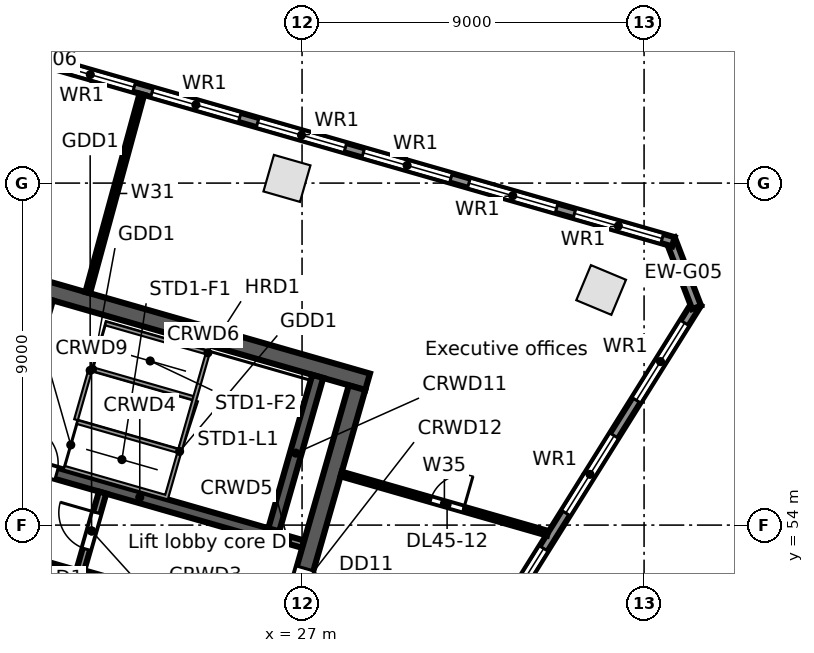
"""IFC4 building model, lengths in metres.
Left out: names, types, materials, properties, quantities, classifications, styles, units other than length and angle.
Written with IfcOpenShell. Run it as: python <this file> out.ifc"""

import sys

from ifc_helpers import new_model, si_unit, direction, frame, frame_2d, origin, origin_2d, place, context, subcontext, project, spatial, rectangle, extrude, element, fill, save


model = new_model("IFC4")
c1 = context("Model", 3, precision=1e-05, world=origin(), true_north=direction((0.0, 1.0)))
c2 = subcontext(c1, "Body", "Model", "MODEL_VIEW")
j1 = project(units=[si_unit("LENGTHUNIT", "METRE"), si_unit("PLANEANGLEUNIT", "RADIAN")], contexts=[c1])
p1 = place(None, origin())
s1 = spatial("IfcSite", under=j1, at=p1, CompositionType="ELEMENT")
p2 = place(p1, origin())
s2 = spatial("IfcBuilding", under=s1, at=p2, CompositionType="ELEMENT")
p3 = place(p2, frame((0.0, 0.0, 207.5)))
s3 = spatial("IfcBuildingStorey", under=s2, at=p3, CompositionType="ELEMENT", Elevation=207.5)
for number, where, z_axis, x_axis in (
    (1, (26.603, 63.124, 0.0), (0.0, 0.0, 1.0), (-0.961, 0.276, 0.0)),
    (2, (34.87, 60.187, 0.0), (0.0, 0.0, 1.0), (-0.923, 0.385, 0.0)),
):
    element("IfcColumn", number, at=place(p3, frame(where, z_axis=z_axis, x_axis=x_axis)), inside=s3, PredefinedType="COLUMN", context=c2, shape_type="SweptSolid", body=[
        extrude(rectangle(XDim=1.0, YDim=1.0, at=origin_2d()), origin(), (0.0, 0.0, 1.0), 3.9),
    ])
p4 = place(p3, frame((37.392, 59.84, 0.0), z_axis=(0.0, 0.0, 1.0), x_axis=(-0.529919909431, -0.848047692992, 0.0)))
e3 = element("IfcWall", 3, at=p4, inside=s3, PredefinedType="STANDARD", context=c2, shape_type="SweptSolid", body=[
    extrude(rectangle(XDim=21.104, YDim=0.25, at=frame_2d((10.552, 0.0))), origin(), (0.0, 0.0, 1.0), 3.62),
])
p5 = place(p4, frame((18.112, 0.0, 0.8)))
e4 = element("IfcOpeningElement", 4, at=p5, cuts=e3, PredefinedType="OPENING", context=c2, shape_type="SweptSolid", body=[
    extrude(rectangle(XDim=2.4, YDim=2.2, at=frame_2d((1.2, 1.1))), frame((0.0, 0.135, 0.0), z_axis=(0.0, -1.0, 0.0), x_axis=(1.0, 0.0, 0.0)), (0.0, 0.0, 1.0), 0.27),
])
p6 = place(p4, frame((14.612, 0.0, 0.8)))
e5 = element("IfcOpeningElement", 5, at=p6, cuts=e3, PredefinedType="OPENING", context=c2, shape_type="SweptSolid", body=[
    extrude(rectangle(XDim=2.4, YDim=2.2, at=frame_2d((1.2, 1.1))), frame((0.0, 0.135, 0.0), z_axis=(0.0, -1.0, 0.0), x_axis=(1.0, 0.0, 0.0)), (0.0, 0.0, 1.0), 0.27),
])
p7 = place(p4, frame((11.112, 0.0, 0.8)))
e6 = element("IfcOpeningElement", 6, at=p7, cuts=e3, PredefinedType="OPENING", context=c2, shape_type="SweptSolid", body=[
    extrude(rectangle(XDim=2.4, YDim=2.2, at=frame_2d((1.2, 1.1))), frame((0.0, 0.135, 0.0), z_axis=(0.0, -1.0, 0.0), x_axis=(1.0, 0.0, 0.0)), (0.0, 0.0, 1.0), 0.27),
])
p8 = place(p4, frame((7.612, 0.0, 0.8)))
e7 = element("IfcOpeningElement", 7, at=p8, cuts=e3, PredefinedType="OPENING", context=c2, shape_type="SweptSolid", body=[
    extrude(rectangle(XDim=2.4, YDim=2.2, at=frame_2d((1.2, 1.1))), frame((0.0, 0.135, 0.0), z_axis=(0.0, -1.0, 0.0), x_axis=(1.0, 0.0, 0.0)), (0.0, 0.0, 1.0), 0.27),
])
p9 = place(p4, frame((4.112, 0.0, 0.8)))
e8 = element("IfcOpeningElement", 8, at=p9, cuts=e3, PredefinedType="OPENING", context=c2, shape_type="SweptSolid", body=[
    extrude(rectangle(XDim=2.4, YDim=2.2, at=frame_2d((1.2, 1.1))), frame((0.0, 0.135, 0.0), z_axis=(0.0, -1.0, 0.0), x_axis=(1.0, 0.0, 0.0)), (0.0, 0.0, 1.0), 0.27),
])
p10 = place(p4, frame((0.612, 0.0, 0.8)))
e9 = element("IfcOpeningElement", 9, at=p10, cuts=e3, PredefinedType="OPENING", context=c2, shape_type="SweptSolid", body=[
    extrude(rectangle(XDim=2.4, YDim=2.2, at=frame_2d((1.2, 1.1))), frame((0.0, 0.135, 0.0), z_axis=(0.0, -1.0, 0.0), x_axis=(1.0, 0.0, 0.0)), (0.0, 0.0, 1.0), 0.27),
])
p11 = place(p3, frame((36.69, 61.531, 0.0), z_axis=(0.0, 0.0, 1.0), x_axis=(0.358377147136, -0.933576895821, 0.0)))
e10 = element("IfcWall", 10, at=p11, inside=s3, PredefinedType="STANDARD", context=c2, shape_type="SweptSolid", body=[
    extrude(rectangle(XDim=1.93, YDim=0.25, at=frame_2d((0.965, 0.0))), origin(), (0.0, 0.0, 1.0), 3.62),
])
p12 = place(p3, frame((3.34, 71.042, 0.0), z_axis=(0.0, 0.0, 1.0), x_axis=(0.96126179431, -0.275637012753, 0.0)))
e11 = element("IfcWall", 11, at=p12, inside=s3, PredefinedType="STANDARD", context=c2, shape_type="SweptSolid", body=[
    extrude(rectangle(XDim=34.779, YDim=0.25, at=frame_2d((17.39, 0.0))), origin(), (0.0, 0.0, 1.0), 3.62),
])
p13 = place(p12, frame((32.071, 0.0, 0.8)))
e12 = element("IfcOpeningElement", 12, at=p13, cuts=e11, PredefinedType="OPENING", context=c2, shape_type="SweptSolid", body=[
    extrude(rectangle(XDim=2.4, YDim=2.2, at=frame_2d((1.2, 1.1))), frame((0.0, 0.135, 0.0), z_axis=(0.0, -1.0, 0.0), x_axis=(1.0, 0.0, 0.0)), (0.0, 0.0, 1.0), 0.27),
])
p14 = place(p12, frame((29.18, 0.0, 0.8)))
e13 = element("IfcOpeningElement", 13, at=p14, cuts=e11, PredefinedType="OPENING", context=c2, shape_type="SweptSolid", body=[
    extrude(rectangle(XDim=2.4, YDim=2.2, at=frame_2d((1.2, 1.1))), frame((0.0, 0.135, 0.0), z_axis=(0.0, -1.0, 0.0), x_axis=(1.0, 0.0, 0.0)), (0.0, 0.0, 1.0), 0.27),
])
p15 = place(p12, frame((26.289, 0.0, 0.8)))
e14 = element("IfcOpeningElement", 14, at=p15, cuts=e11, PredefinedType="OPENING", context=c2, shape_type="SweptSolid", body=[
    extrude(rectangle(XDim=2.4, YDim=2.2, at=frame_2d((1.2, 1.1))), frame((0.0, 0.135, 0.0), z_axis=(0.0, -1.0, 0.0), x_axis=(1.0, 0.0, 0.0)), (0.0, 0.0, 1.0), 0.27),
])
p16 = place(p12, frame((23.398, 0.0, 0.8)))
e15 = element("IfcOpeningElement", 15, at=p16, cuts=e11, PredefinedType="OPENING", context=c2, shape_type="SweptSolid", body=[
    extrude(rectangle(XDim=2.4, YDim=2.2, at=frame_2d((1.2, 1.1))), frame((0.0, 0.135, 0.0), z_axis=(0.0, -1.0, 0.0), x_axis=(1.0, 0.0, 0.0)), (0.0, 0.0, 1.0), 0.27),
])
p17 = place(p12, frame((20.508, 0.0, 0.8)))
e16 = element("IfcOpeningElement", 16, at=p17, cuts=e11, PredefinedType="OPENING", context=c2, shape_type="SweptSolid", body=[
    extrude(rectangle(XDim=2.4, YDim=2.2, at=frame_2d((1.2, 1.1))), frame((0.0, 0.135, 0.0), z_axis=(0.0, -1.0, 0.0), x_axis=(1.0, 0.0, 0.0)), (0.0, 0.0, 1.0), 0.27),
])
p18 = place(p12, frame((17.616, 0.0, 0.8)))
e17 = element("IfcOpeningElement", 17, at=p18, cuts=e11, PredefinedType="OPENING", context=c2, shape_type="SweptSolid", body=[
    extrude(rectangle(XDim=2.4, YDim=2.2, at=frame_2d((1.2, 1.1))), frame((0.0, 0.135, 0.0), z_axis=(0.0, -1.0, 0.0), x_axis=(1.0, 0.0, 0.0)), (0.0, 0.0, 1.0), 0.27),
])
p19 = place(p12, frame((14.726, 0.0, 0.8)))
e18 = element("IfcOpeningElement", 18, at=p19, cuts=e11, PredefinedType="OPENING", context=c2, shape_type="SweptSolid", body=[
    extrude(rectangle(XDim=2.4, YDim=2.2, at=frame_2d((1.2, 1.1))), frame((0.0, 0.135, 0.0), z_axis=(0.0, -1.0, 0.0), x_axis=(1.0, 0.0, 0.0)), (0.0, 0.0, 1.0), 0.27),
])
p20 = place(p12, frame((11.834, 0.0, 0.8)))
e19 = element("IfcOpeningElement", 19, at=p20, cuts=e11, PredefinedType="OPENING", context=c2, shape_type="SweptSolid", body=[
    extrude(rectangle(XDim=2.4, YDim=2.2, at=frame_2d((1.2, 1.1))), frame((0.0, 0.135, 0.0), z_axis=(0.0, -1.0, 0.0), x_axis=(1.0, 0.0, 0.0)), (0.0, 0.0, 1.0), 0.27),
])
p21 = place(p12, frame((8.944, 0.0, 0.8)))
e20 = element("IfcOpeningElement", 20, at=p21, cuts=e11, PredefinedType="OPENING", context=c2, shape_type="SweptSolid", body=[
    extrude(rectangle(XDim=2.4, YDim=2.2, at=frame_2d((1.2, 1.1))), frame((0.0, 0.135, 0.0), z_axis=(0.0, -1.0, 0.0), x_axis=(1.0, 0.0, 0.0)), (0.0, 0.0, 1.0), 0.27),
])
p22 = place(p12, frame((6.052, 0.0, 0.8)))
e21 = element("IfcOpeningElement", 21, at=p22, cuts=e11, PredefinedType="OPENING", context=c2, shape_type="SweptSolid", body=[
    extrude(rectangle(XDim=2.4, YDim=2.2, at=frame_2d((1.2, 1.1))), frame((0.0, 0.135, 0.0), z_axis=(0.0, -1.0, 0.0), x_axis=(1.0, 0.0, 0.0)), (0.0, 0.0, 1.0), 0.27),
])
p23 = place(p12, frame((3.162, 0.0, 0.8)))
e22 = element("IfcOpeningElement", 22, at=p23, cuts=e11, PredefinedType="OPENING", context=c2, shape_type="SweptSolid", body=[
    extrude(rectangle(XDim=2.4, YDim=2.2, at=frame_2d((1.2, 1.1))), frame((0.0, 0.135, 0.0), z_axis=(0.0, -1.0, 0.0), x_axis=(1.0, 0.0, 0.0)), (0.0, 0.0, 1.0), 0.27),
])
p24 = place(p12, frame((0.271, 0.0, 0.8)))
e23 = element("IfcOpeningElement", 23, at=p24, cuts=e11, PredefinedType="OPENING", context=c2, shape_type="SweptSolid", body=[
    extrude(rectangle(XDim=2.4, YDim=2.2, at=frame_2d((1.2, 1.1))), frame((0.0, 0.135, 0.0), z_axis=(0.0, -1.0, 0.0), x_axis=(1.0, 0.0, 0.0)), (0.0, 0.0, 1.0), 0.27),
])
p25 = place(p3, frame((18.583, 53.423, 0.0), z_axis=(0.0, 0.0, 1.0), x_axis=(0.961259287968, -0.275645753268, 0.0)))
e24 = element("IfcWall", 24, at=p25, inside=s3, PredefinedType="SOLIDWALL", context=c2, shape_type="SweptSolid", body=[
    extrude(rectangle(XDim=2.65, YDim=0.2, at=frame_2d((1.325, 0.0))), origin(), (0.0, 0.0, 1.0), 3.62),
])
p26 = place(p3, frame((21.131, 52.692, 0.0), z_axis=(0.0, 0.0, 1.0), x_axis=(0.961261488075, -0.275638080722, 0.0)))
e25 = element("IfcWall", 25, at=p26, inside=s3, PredefinedType="SOLIDWALL", context=c2, shape_type="SweptSolid", body=[
    extrude(rectangle(XDim=5.45, YDim=0.3, at=frame_2d((2.725, 0.0))), origin(), (0.0, 0.0, 1.0), 3.62),
])
p27 = place(p26, frame((0.95, 0.0, 0.0)))
e26 = element("IfcOpeningElement", 26, at=p27, cuts=e25, PredefinedType="OPENING", context=c2, shape_type="SweptSolid", body=[
    extrude(rectangle(XDim=0.9, YDim=2.1, at=frame_2d((0.45, 1.05))), frame((0.0, 0.16, 0.0), z_axis=(0.0, -1.0, 0.0), x_axis=(1.0, 0.0, 0.0)), (0.0, 0.0, 1.0), 0.32),
])
p28 = place(p26, frame((3.75, 0.0, 0.0)))
e27 = element("IfcOpeningElement", 27, at=p28, cuts=e25, PredefinedType="OPENING", context=c2, shape_type="SweptSolid", body=[
    extrude(rectangle(XDim=0.9, YDim=2.1, at=frame_2d((0.45, 1.05))), frame((0.0, 0.16, 0.0), z_axis=(0.0, -1.0, 0.0), x_axis=(1.0, 0.0, 0.0)), (0.0, 0.0, 1.0), 0.32),
])
p29 = place(p3, frame((19.245, 55.73, 0.0), z_axis=(0.0, 0.0, 1.0), x_axis=(0.961263007877, -0.275632780503, 0.0)))
e28 = element("IfcWall", 28, at=p29, inside=s3, PredefinedType="SOLIDWALL", context=c2, shape_type="SweptSolid", body=[
    extrude(rectangle(XDim=7.25, YDim=0.3, at=frame_2d((3.625, 0.0))), origin(), (0.0, 0.0, 1.0), 3.62),
])
p30 = place(p29, frame((0.35, 0.0, 0.0)))
e29 = element("IfcOpeningElement", 29, at=p30, cuts=e28, PredefinedType="OPENING", context=c2, shape_type="SweptSolid", body=[
    extrude(rectangle(XDim=1.0, YDim=2.1, at=frame_2d((0.5, 1.05))), frame((0.0, 0.16, 0.0), z_axis=(0.0, -1.0, 0.0), x_axis=(1.0, 0.0, 0.0)), (0.0, 0.0, 1.0), 0.32),
])
p31 = place(p3, frame((26.214, 53.732, 0.0), z_axis=(0.0, 0.0, 1.0), x_axis=(0.961241665642, -0.275707200184, 0.0)))
e30 = element("IfcWall", 30, at=p31, inside=s3, PredefinedType="SOLIDWALL", context=c2, shape_type="SweptSolid", body=[
    extrude(rectangle(XDim=0.85, YDim=0.2, at=frame_2d((0.425, 0.0))), origin(), (0.0, 0.0, 1.0), 3.62),
])
p32 = place(p3, frame((20.073, 60.252, 0.0), z_axis=(0.0, 0.0, 1.0), x_axis=(0.96126248289, -0.275634611374, 0.0)))
e31 = element("IfcWall", 31, at=p32, inside=s3, PredefinedType="SOLIDWALL", context=c2, shape_type="SweptSolid", body=[
    extrude(rectangle(XDim=9.0, YDim=0.45, at=frame_2d((4.5, 0.0))), origin(), (0.0, 0.0, 1.0), 3.62),
])
p33 = place(p3, frame((17.168, 49.303, 0.0), z_axis=(0.0, 0.0, 1.0), x_axis=(0.275638974822, 0.961261231695, 0.0)))
e32 = element("IfcWall", 32, at=p33, inside=s3, PredefinedType="SOLIDWALL", context=c2, shape_type="SweptSolid", body=[
    extrude(rectangle(XDim=11.1, YDim=0.45, at=frame_2d((5.55, 0.0))), origin(), (0.0, 0.0, 1.0), 3.62),
])
p34 = place(p33, frame((4.95, 0.0, 0.0)))
e33 = element("IfcOpeningElement", 33, at=p34, cuts=e32, PredefinedType="OPENING", context=c2, shape_type="SweptSolid", body=[
    extrude(rectangle(XDim=1.2, YDim=2.1, at=frame_2d((0.6, 1.05))), frame((0.0, 0.235, 0.0), z_axis=(0.0, -1.0, 0.0), x_axis=(1.0, 0.0, 0.0)), (0.0, 0.0, 1.0), 0.47),
])
p35 = place(p3, frame((21.172, 52.837, 0.0), z_axis=(0.0, 0.0, 1.0), x_axis=(0.275657676022, 0.961255868981, 0.0)))
e34 = element("IfcWall", 34, at=p35, inside=s3, PredefinedType="PARTITIONING", context=c2, shape_type="SweptSolid", body=[
    extrude(rectangle(XDim=2.1, YDim=0.2, at=frame_2d((1.05, 0.0))), origin(), (0.0, 0.0, 1.0), 3.62),
])
p36 = place(p35, frame((0.55, 0.0, 0.0)))
e35 = element("IfcOpeningElement", 35, at=p36, cuts=e34, PredefinedType="OPENING", context=c2, shape_type="SweptSolid", body=[
    extrude(rectangle(XDim=1.0, YDim=2.1, at=frame_2d((0.5, 1.05))), frame((0.0, 0.11, 0.0), z_axis=(0.0, -1.0, 0.0), x_axis=(1.0, 0.0, 0.0)), (0.0, 0.0, 1.0), 0.22),
])
p37 = place(p3, frame((26.256, 53.876, 0.0), z_axis=(0.0, 0.0, 1.0), x_axis=(0.275588560745, 0.96127568636, 0.0)))
e36 = element("IfcWall", 36, at=p37, inside=s3, PredefinedType="SOLIDWALL", context=c2, shape_type="SweptSolid", body=[
    extrude(rectangle(XDim=4.2, YDim=0.3, at=frame_2d((2.1, 0.0))), origin(), (0.0, 0.0, 1.0), 3.62),
])
p38 = place(p3, frame((25.387, 46.947, 0.0), z_axis=(0.0, 0.0, 1.0), x_axis=(0.275638974822, 0.961261231695, 0.0)))
e37 = element("IfcWall", 37, at=p38, inside=s3, PredefinedType="SOLIDWALL", context=c2, shape_type="SweptSolid", body=[
    extrude(rectangle(XDim=11.1, YDim=0.45, at=frame_2d((5.55, 0.0))), origin(), (0.0, 0.0, 1.0), 3.62),
])
p39 = place(p38, frame((4.95, 0.0, 0.0)))
e38 = element("IfcOpeningElement", 38, at=p39, cuts=e37, PredefinedType="OPENING", context=c2, shape_type="SweptSolid", body=[
    extrude(rectangle(XDim=1.2, YDim=2.1, at=frame_2d((0.6, 1.05))), frame((0.0, 0.235, 0.0), z_axis=(0.0, -1.0, 0.0), x_axis=(1.0, 0.0, 0.0)), (0.0, 0.0, 1.0), 0.47),
])
p40 = place(p3, frame((21.36, 60.117, 0.0), z_axis=(0.0, 0.0, 1.0), x_axis=(0.263151767798, 0.964754449124, 0.0)))
e39 = element("IfcWall", 39, at=p40, inside=s3, PredefinedType="PARTITIONING", context=c2, shape_type="SweptSolid", body=[
    extrude(rectangle(XDim=5.411, YDim=0.125, at=frame_2d((2.705, 0.0))), origin(), (0.0, 0.0, 1.0), 3.0),
])
p41 = place(p3, frame((28.029, 55.344, 0.0), z_axis=(0.0, 0.0, 1.0), x_axis=(0.961249621014, -0.275679462603, 0.0)))
e40 = element("IfcWall", 40, at=p41, inside=s3, PredefinedType="PARTITIONING", context=c2, shape_type="SweptSolid", body=[
    extrude(rectangle(XDim=5.652, YDim=0.125, at=frame_2d((2.826, 0.0))), origin(), (0.0, 0.0, 1.0), 2.988),
])
p42 = place(p41, frame((2.45, 0.0, 0.0)))
e41 = element("IfcOpeningElement", 41, at=p42, cuts=e40, PredefinedType="OPENING", context=c2, shape_type="SweptSolid", body=[
    extrude(rectangle(XDim=0.9, YDim=2.1, at=frame_2d((0.45, 1.05))), frame((0.0, 0.073, 0.0), z_axis=(0.0, -1.0, 0.0), x_axis=(1.0, 0.0, 0.0)), (0.0, 0.0, 1.0), 0.145),
])
p43 = place(p8, origin())
e42 = element("IfcWindow", 42, at=p43, inside=s3, PartitioningType="SINGLE_PANEL", PredefinedType="WINDOW", context=c2, shape_type="SweptSolid", body=[
    extrude(rectangle(XDim=2.4, YDim=2.2, at=frame_2d((1.2, 1.1))), frame((0.0, 0.03, 0.0), z_axis=(0.0, -1.0, 0.0), x_axis=(1.0, 0.0, 0.0)), (0.0, 0.0, 1.0), 0.06),
])
fill(e7, e42)
p44 = place(p9, origin())
e43 = element("IfcWindow", 43, at=p44, inside=s3, PartitioningType="SINGLE_PANEL", PredefinedType="WINDOW", context=c2, shape_type="SweptSolid", body=[
    extrude(rectangle(XDim=2.4, YDim=2.2, at=frame_2d((1.2, 1.1))), frame((0.0, 0.03, 0.0), z_axis=(0.0, -1.0, 0.0), x_axis=(1.0, 0.0, 0.0)), (0.0, 0.0, 1.0), 0.06),
])
fill(e8, e43)
p45 = place(p10, origin())
e44 = element("IfcWindow", 44, at=p45, inside=s3, PartitioningType="SINGLE_PANEL", PredefinedType="WINDOW", context=c2, shape_type="SweptSolid", body=[
    extrude(rectangle(XDim=2.4, YDim=2.2, at=frame_2d((1.2, 1.1))), frame((0.0, 0.03, 0.0), z_axis=(0.0, -1.0, 0.0), x_axis=(1.0, 0.0, 0.0)), (0.0, 0.0, 1.0), 0.06),
])
fill(e9, e44)
p46 = place(p13, origin())
e45 = element("IfcWindow", 45, at=p46, inside=s3, PartitioningType="SINGLE_PANEL", PredefinedType="WINDOW", context=c2, shape_type="SweptSolid", body=[
    extrude(rectangle(XDim=2.4, YDim=2.2, at=frame_2d((1.2, 1.1))), frame((0.0, 0.03, 0.0), z_axis=(0.0, -1.0, 0.0), x_axis=(1.0, 0.0, 0.0)), (0.0, 0.0, 1.0), 0.06),
])
fill(e12, e45)
p47 = place(p14, origin())
e46 = element("IfcWindow", 46, at=p47, inside=s3, PartitioningType="SINGLE_PANEL", PredefinedType="WINDOW", context=c2, shape_type="SweptSolid", body=[
    extrude(rectangle(XDim=2.4, YDim=2.2, at=frame_2d((1.2, 1.1))), frame((0.0, 0.03, 0.0), z_axis=(0.0, -1.0, 0.0), x_axis=(1.0, 0.0, 0.0)), (0.0, 0.0, 1.0), 0.06),
])
fill(e13, e46)
p48 = place(p15, origin())
e47 = element("IfcWindow", 47, at=p48, inside=s3, PartitioningType="SINGLE_PANEL", PredefinedType="WINDOW", context=c2, shape_type="SweptSolid", body=[
    extrude(rectangle(XDim=2.4, YDim=2.2, at=frame_2d((1.2, 1.1))), frame((0.0, 0.03, 0.0), z_axis=(0.0, -1.0, 0.0), x_axis=(1.0, 0.0, 0.0)), (0.0, 0.0, 1.0), 0.06),
])
fill(e14, e47)
p49 = place(p16, origin())
e48 = element("IfcWindow", 48, at=p49, inside=s3, PartitioningType="SINGLE_PANEL", PredefinedType="WINDOW", context=c2, shape_type="SweptSolid", body=[
    extrude(rectangle(XDim=2.4, YDim=2.2, at=frame_2d((1.2, 1.1))), frame((0.0, 0.03, 0.0), z_axis=(0.0, -1.0, 0.0), x_axis=(1.0, 0.0, 0.0)), (0.0, 0.0, 1.0), 0.06),
])
fill(e15, e48)
p50 = place(p17, origin())
e49 = element("IfcWindow", 49, at=p50, inside=s3, PartitioningType="SINGLE_PANEL", PredefinedType="WINDOW", context=c2, shape_type="SweptSolid", body=[
    extrude(rectangle(XDim=2.4, YDim=2.2, at=frame_2d((1.2, 1.1))), frame((0.0, 0.03, 0.0), z_axis=(0.0, -1.0, 0.0), x_axis=(1.0, 0.0, 0.0)), (0.0, 0.0, 1.0), 0.06),
])
fill(e16, e49)
p51 = place(p18, origin())
e50 = element("IfcWindow", 50, at=p51, inside=s3, PartitioningType="SINGLE_PANEL", PredefinedType="WINDOW", context=c2, shape_type="SweptSolid", body=[
    extrude(rectangle(XDim=2.4, YDim=2.2, at=frame_2d((1.2, 1.1))), frame((0.0, 0.03, 0.0), z_axis=(0.0, -1.0, 0.0), x_axis=(1.0, 0.0, 0.0)), (0.0, 0.0, 1.0), 0.06),
])
fill(e17, e50)
p52 = place(p30, origin())
e51 = element("IfcDoor", 51, at=p52, inside=s3, OperationType="SINGLE_SWING_LEFT", PredefinedType="DOOR", context=c2, shape_type="SweptSolid", body=[
    extrude(rectangle(XDim=1.0, YDim=2.1, at=frame_2d((0.5, 1.05))), frame((0.0, 0.025, 0.0), z_axis=(0.0, -1.0, 0.0), x_axis=(1.0, 0.0, 0.0)), (0.0, 0.0, 1.0), 0.05),
])
fill(e29, e51)
p53 = place(p36, origin())
e52 = element("IfcDoor", 52, at=p53, inside=s3, OperationType="SINGLE_SWING_RIGHT", PredefinedType="DOOR", context=c2, shape_type="SweptSolid", body=[
    extrude(rectangle(XDim=1.0, YDim=2.1, at=frame_2d((0.5, 1.05))), frame((0.0, 0.025, 0.0), z_axis=(0.0, -1.0, 0.0), x_axis=(1.0, 0.0, 0.0)), (0.0, 0.0, 1.0), 0.05),
])
fill(e35, e52)
p54 = place(p39, frame((1.2, 0.0, 0.0), z_axis=(0.0, 0.0, 1.0), x_axis=(-1.0, 0.0, 0.0)))
e53 = element("IfcDoor", 53, at=p54, inside=s3, OperationType="SINGLE_SWING_RIGHT", PredefinedType="DOOR", context=c2, shape_type="SweptSolid", body=[
    extrude(rectangle(XDim=1.2, YDim=2.1, at=frame_2d((0.6, 1.05))), frame((0.0, 0.025, 0.0), z_axis=(0.0, -1.0, 0.0), x_axis=(1.0, 0.0, 0.0)), (0.0, 0.0, 1.0), 0.05),
])
fill(e38, e53)
p55 = place(p42, origin())
e54 = element("IfcDoor", 54, at=p55, inside=s3, OperationType="SINGLE_SWING_RIGHT", PredefinedType="DOOR", context=c2, shape_type="SweptSolid", body=[
    extrude(rectangle(XDim=0.9, YDim=2.1, at=frame_2d((0.45, 1.05))), frame((0.0, 0.025, 0.0), z_axis=(0.0, -1.0, 0.0), x_axis=(1.0, 0.0, 0.0)), (0.0, 0.0, 1.0), 0.05),
])
fill(e41, e54)
save(model, sys.argv[1])
